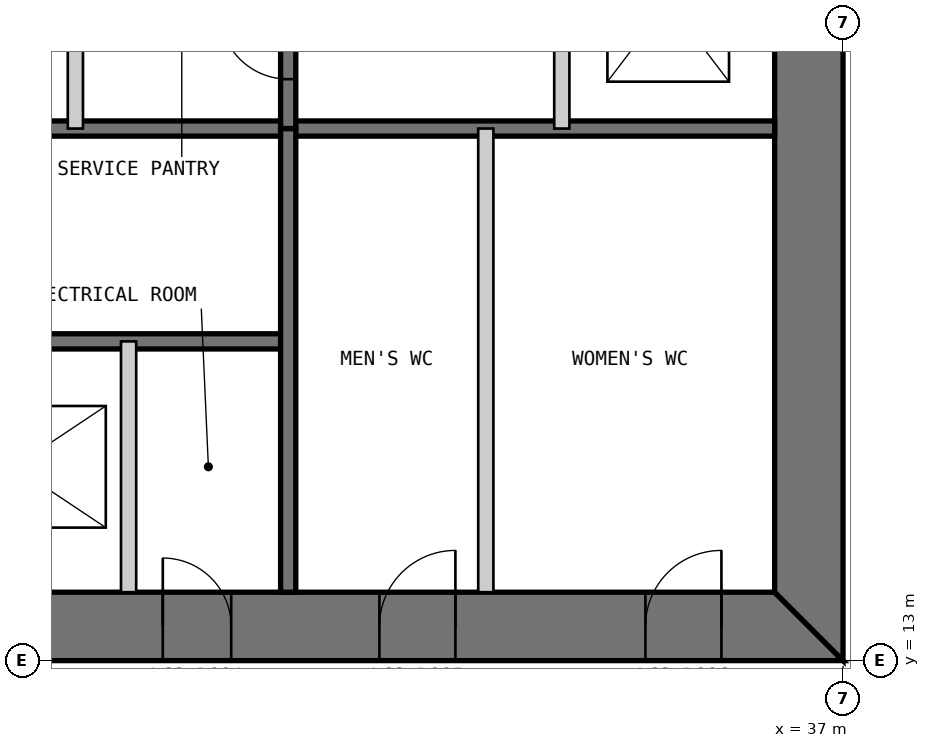
"""IFC4 building model, lengths in metres.
Left out: names, types, materials, properties, quantities, classifications, styles, units other than length and angle.
Written with IfcOpenShell. Run it as: python <this file> out.ifc"""

import sys

from ifc_helpers import new_model, si_unit, direction, frame, frame_2d, origin, place, context, subcontext, project, spatial, polyline, rectangle, outline, extrude, element, fill, save


model = new_model("IFC4")
c1 = context("Model", 3, precision=1e-05, world=origin(), true_north=direction((0.0, 1.0)))
c2 = subcontext(c1, "Body", "Model", "MODEL_VIEW")
j1 = project(units=[si_unit("LENGTHUNIT", "METRE"), si_unit("PLANEANGLEUNIT", "RADIAN")], contexts=[c1])
p1 = place(None, origin())
s1 = spatial("IfcSite", under=j1, at=p1, CompositionType="ELEMENT")
p2 = place(p1, origin())
s2 = spatial("IfcBuilding", under=s1, at=p2, CompositionType="ELEMENT")
p3 = place(p2, frame((0.0, 0.0, 262.8)))
s3 = spatial("IfcBuildingStorey", under=s2, at=p3, CompositionType="ELEMENT", Elevation=262.8)
p4 = place(p3, frame((13.0, 13.45, 0.0), z_axis=(0.0, 0.0, 1.0), x_axis=(1.0, 0.0, 0.0)))
e1 = element("IfcWall", 1, at=p4, inside=s3, PredefinedType="SHEAR", context=c2, shape_type="SweptSolid", body=[
    extrude(outline(polyline([(0.0, -0.45), (24.0, -0.45), (23.1, 0.45), (0.9, 0.45), (0.0, -0.45)])), origin(), (0.0, 0.0, 1.0), 3.4),
])
p5 = place(p4, frame((4.9, 0.0, 0.0)))
e2 = element("IfcOpeningElement", 2, at=p5, cuts=e1, PredefinedType="OPENING", context=c2, shape_type="SweptSolid", body=[
    extrude(rectangle(XDim=1.0, YDim=2.2, at=frame_2d((0.5, 1.1))), frame((0.0, 0.46, 0.0), z_axis=(0.0, -1.0, 0.0), x_axis=(1.0, 0.0, 0.0)), (0.0, 0.0, 1.0), 0.92),
])
p6 = place(p4, frame((8.9, 0.0, 0.0)))
e3 = element("IfcOpeningElement", 3, at=p6, cuts=e1, PredefinedType="OPENING", context=c2, shape_type="SweptSolid", body=[
    extrude(rectangle(XDim=1.1, YDim=2.2, at=frame_2d((0.55, 1.1))), frame((0.0, 0.46, 0.0), z_axis=(0.0, -1.0, 0.0), x_axis=(1.0, 0.0, 0.0)), (0.0, 0.0, 1.0), 0.92),
])
p7 = place(p4, frame((15.05, 0.0, 0.0)))
e4 = element("IfcOpeningElement", 4, at=p7, cuts=e1, PredefinedType="OPENING", context=c2, shape_type="SweptSolid", body=[
    extrude(rectangle(XDim=0.9, YDim=2.2, at=frame_2d((0.45, 1.1))), frame((0.0, 0.46, 0.0), z_axis=(0.0, -1.0, 0.0), x_axis=(1.0, 0.0, 0.0)), (0.0, 0.0, 1.0), 0.92),
])
p8 = place(p4, frame((17.9, 0.0, 0.0)))
e5 = element("IfcOpeningElement", 5, at=p8, cuts=e1, PredefinedType="OPENING", context=c2, shape_type="SweptSolid", body=[
    extrude(rectangle(XDim=1.0, YDim=2.2, at=frame_2d((0.5, 1.1))), frame((0.0, 0.46, 0.0), z_axis=(0.0, -1.0, 0.0), x_axis=(1.0, 0.0, 0.0)), (0.0, 0.0, 1.0), 0.92),
])
p9 = place(p4, frame((21.4, 0.0, 0.0)))
e6 = element("IfcOpeningElement", 6, at=p9, cuts=e1, PredefinedType="OPENING", context=c2, shape_type="SweptSolid", body=[
    extrude(rectangle(XDim=1.0, YDim=2.2, at=frame_2d((0.5, 1.1))), frame((0.0, 0.46, 0.0), z_axis=(0.0, -1.0, 0.0), x_axis=(1.0, 0.0, 0.0)), (0.0, 0.0, 1.0), 0.92),
])
p10 = place(p3, frame((36.55, 13.9, 0.0), z_axis=(0.0, 0.0, 1.0), x_axis=(0.0, 1.0, 0.0)))
e7 = element("IfcWall", 7, at=p10, inside=s3, PredefinedType="SHEAR", context=c2, shape_type="SweptSolid", body=[
    extrude(outline(polyline([(-0.9, -0.45), (23.1, -0.45), (22.2, 0.45), (0.0, 0.45), (-0.9, -0.45)])), origin(), (0.0, 0.0, 1.0), 3.4),
])
p11 = place(p10, frame((20.2, 0.0, 0.0)))
e8 = element("IfcOpeningElement", 8, at=p11, cuts=e7, PredefinedType="OPENING", context=c2, shape_type="SweptSolid", body=[
    extrude(rectangle(XDim=1.0, YDim=2.2, at=frame_2d((0.5, 1.1))), frame((0.0, 0.46, 0.0), z_axis=(0.0, -1.0, 0.0), x_axis=(1.0, 0.0, 0.0)), (0.0, 0.0, 1.0), 0.92),
])
p12 = place(p10, frame((17.25, 0.0, 0.0)))
e9 = element("IfcOpeningElement", 9, at=p12, cuts=e7, PredefinedType="OPENING", context=c2, shape_type="SweptSolid", body=[
    extrude(rectangle(XDim=0.9, YDim=2.2, at=frame_2d((0.45, 1.1))), frame((0.0, 0.46, 0.0), z_axis=(0.0, -1.0, 0.0), x_axis=(1.0, 0.0, 0.0)), (0.0, 0.0, 1.0), 0.92),
])
p13 = place(p3, frame((20.3, 17.2, 0.0), z_axis=(0.0, 0.0, 1.0), x_axis=(1.0, 0.0, 0.0)))
e10 = element("IfcWall", 10, at=p13, inside=s3, PredefinedType="SOLIDWALL", context=c2, shape_type="SweptSolid", body=[
    extrude(rectangle(XDim=9.4, YDim=0.2, at=frame_2d((4.7, 0.0))), origin(), (0.0, 0.0, 1.0), 3.2),
])
p14 = place(p13, frame((0.25, 0.0, 0.0)))
e11 = element("IfcOpeningElement", 11, at=p14, cuts=e10, PredefinedType="OPENING", context=c2, shape_type="SweptSolid", body=[
    extrude(rectangle(XDim=1.0, YDim=2.2, at=frame_2d((0.5, 1.1))), frame((0.0, 0.11, 0.0), z_axis=(0.0, -1.0, 0.0), x_axis=(1.0, 0.0, 0.0)), (0.0, 0.0, 1.0), 0.22),
])
p15 = place(p3, frame((20.3, 20.0, 0.0), z_axis=(0.0, 0.0, 1.0), x_axis=(1.0, 0.0, 0.0)))
e12 = element("IfcWall", 12, at=p15, inside=s3, PredefinedType="SOLIDWALL", context=c2, shape_type="SweptSolid", body=[
    extrude(rectangle(XDim=15.8, YDim=0.2, at=frame_2d((7.9, 0.0))), origin(), (0.0, 0.0, 1.0), 3.2),
])
p16 = place(p3, frame((27.6, 13.9, 0.0), z_axis=(0.0, 0.0, 1.0), x_axis=(0.0, 1.0, 0.0)))
e13 = element("IfcWall", 13, at=p16, inside=s3, PredefinedType="PARTITIONING", context=c2, shape_type="SweptSolid", body=[
    extrude(rectangle(XDim=3.3, YDim=0.2, at=frame_2d((1.65, 0.0))), origin(), (0.0, 0.0, 1.0), 3.2),
])
p17 = place(p3, frame((29.7, 13.9, 0.0), z_axis=(0.0, 0.0, 1.0), x_axis=(0.0, 1.0, 0.0)))
e14 = element("IfcWall", 14, at=p17, inside=s3, PredefinedType="SOLIDWALL", context=c2, shape_type="SweptSolid", body=[
    extrude(rectangle(XDim=6.1, YDim=0.2, at=frame_2d((3.05, 0.0))), origin(), (0.0, 0.0, 1.0), 3.2),
])
p18 = place(p3, frame((32.3, 13.9, 0.0), z_axis=(0.0, 0.0, 1.0), x_axis=(0.0, 1.0, 0.0)))
e15 = element("IfcWall", 15, at=p18, inside=s3, PredefinedType="PARTITIONING", context=c2, shape_type="SweptSolid", body=[
    extrude(rectangle(XDim=6.1, YDim=0.2, at=frame_2d((3.05, 0.0))), origin(), (0.0, 0.0, 1.0), 3.2),
])
p19 = place(p3, frame((33.3, 36.1, 0.0), z_axis=(0.0, 0.0, 1.0), x_axis=(0.0, -1.0, 0.0)))
e16 = element("IfcWall", 16, at=p19, inside=s3, PredefinedType="PARTITIONING", context=c2, shape_type="SweptSolid", body=[
    extrude(rectangle(XDim=16.1, YDim=0.2, at=frame_2d((8.05, 0.0))), origin(), (0.0, 0.0, 1.0), 3.2),
])
p20 = place(p19, frame((7.217, 0.0, 0.0)))
e17 = element("IfcOpeningElement", 17, at=p20, cuts=e16, PredefinedType="OPENING", context=c2, shape_type="SweptSolid", body=[
    extrude(rectangle(XDim=1.1, YDim=2.2, at=frame_2d((0.55, 1.1))), frame((0.0, 0.11, 0.0), z_axis=(0.0, -1.0, 0.0), x_axis=(1.0, 0.0, 0.0)), (0.0, 0.0, 1.0), 0.22),
])
p21 = place(p19, frame((10.55, 0.0, 0.0)))
e18 = element("IfcOpeningElement", 18, at=p21, cuts=e16, PredefinedType="OPENING", context=c2, shape_type="SweptSolid", body=[
    extrude(rectangle(XDim=1.1, YDim=2.2, at=frame_2d((0.55, 1.1))), frame((0.0, 0.11, 0.0), z_axis=(0.0, -1.0, 0.0), x_axis=(1.0, 0.0, 0.0)), (0.0, 0.0, 1.0), 0.22),
])
p22 = place(p19, frame((13.883, 0.0, 0.0)))
e19 = element("IfcOpeningElement", 19, at=p22, cuts=e16, PredefinedType="OPENING", context=c2, shape_type="SweptSolid", body=[
    extrude(rectangle(XDim=1.1, YDim=2.2, at=frame_2d((0.55, 1.1))), frame((0.0, 0.11, 0.0), z_axis=(0.0, -1.0, 0.0), x_axis=(1.0, 0.0, 0.0)), (0.0, 0.0, 1.0), 0.22),
])
p23 = place(p3, frame((29.7, 36.1, 0.0), z_axis=(0.0, 0.0, 1.0), x_axis=(0.0, -1.0, 0.0)))
e20 = element("IfcWall", 20, at=p23, inside=s3, PredefinedType="SOLIDWALL", context=c2, shape_type="SweptSolid", body=[
    extrude(rectangle(XDim=16.1, YDim=0.2, at=frame_2d((8.05, 0.0))), origin(), (0.0, 0.0, 1.0), 3.2),
])
p24 = place(p23, frame((7.85, 0.0, 0.0)))
e21 = element("IfcOpeningElement", 21, at=p24, cuts=e20, PredefinedType="OPENING", context=c2, shape_type="SweptSolid", body=[
    extrude(rectangle(XDim=0.9, YDim=2.2, at=frame_2d((0.45, 1.1))), frame((0.0, 0.11, 0.0), z_axis=(0.0, -1.0, 0.0), x_axis=(1.0, 0.0, 0.0)), (0.0, 0.0, 1.0), 0.22),
])
p25 = place(p23, frame((11.75, 0.0, 0.0)))
e22 = element("IfcOpeningElement", 22, at=p25, cuts=e20, PredefinedType="OPENING", context=c2, shape_type="SweptSolid", body=[
    extrude(rectangle(XDim=0.9, YDim=2.2, at=frame_2d((0.45, 1.1))), frame((0.0, 0.11, 0.0), z_axis=(0.0, -1.0, 0.0), x_axis=(1.0, 0.0, 0.0)), (0.0, 0.0, 1.0), 0.22),
])
p26 = place(p23, frame((14.55, 0.0, 0.0)))
e23 = element("IfcOpeningElement", 23, at=p26, cuts=e20, PredefinedType="OPENING", context=c2, shape_type="SweptSolid", body=[
    extrude(rectangle(XDim=0.9, YDim=2.2, at=frame_2d((0.45, 1.1))), frame((0.0, 0.11, 0.0), z_axis=(0.0, -1.0, 0.0), x_axis=(1.0, 0.0, 0.0)), (0.0, 0.0, 1.0), 0.22),
])
p27 = place(p3, frame((26.9, 30.0, 0.0), z_axis=(0.0, 0.0, 1.0), x_axis=(0.0, -1.0, 0.0)))
e24 = element("IfcWall", 24, at=p27, inside=s3, PredefinedType="PARTITIONING", context=c2, shape_type="SweptSolid", body=[
    extrude(rectangle(XDim=10.0, YDim=0.2, at=frame_2d((5.0, 0.0))), origin(), (0.0, 0.0, 1.0), 3.2),
])
p28 = place(p7, origin())
e25 = element("IfcDoor", 25, at=p28, inside=s3, OperationType="SINGLE_SWING_LEFT", PredefinedType="DOOR", context=c2, shape_type="SweptSolid", body=[
    extrude(rectangle(XDim=0.9, YDim=2.2, at=frame_2d((0.45, 1.1))), frame((0.0, 0.025, 0.0), z_axis=(0.0, -1.0, 0.0), x_axis=(1.0, 0.0, 0.0)), (0.0, 0.0, 1.0), 0.05),
    extrude(outline(polyline([(0.0, 0.0), (0.04, 0.0), (0.04, 2.16), (0.86, 2.16), (0.86, 0.0), (0.9, 0.0), (0.9, 2.2), (0.0, 2.2), (0.0, 0.0)])), frame((0.0, 0.3, 0.0), z_axis=(0.0, -1.0, 0.0), x_axis=(1.0, 0.0, 0.0)), (0.0, 0.0, 1.0), 0.6),
])
fill(e4, e25)
p29 = place(p8, origin())
e26 = element("IfcDoor", 26, at=p29, inside=s3, OperationType="SINGLE_SWING_RIGHT", PredefinedType="DOOR", context=c2, shape_type="SweptSolid", body=[
    extrude(rectangle(XDim=1.0, YDim=2.2, at=frame_2d((0.5, 1.1))), frame((0.0, 0.025, 0.0), z_axis=(0.0, -1.0, 0.0), x_axis=(1.0, 0.0, 0.0)), (0.0, 0.0, 1.0), 0.05),
    extrude(outline(polyline([(0.0, 0.0), (0.04, 0.0), (0.04, 2.16), (0.96, 2.16), (0.96, 0.0), (1.0, 0.0), (1.0, 2.2), (0.0, 2.2), (0.0, 0.0)])), frame((0.0, 0.3, 0.0), z_axis=(0.0, -1.0, 0.0), x_axis=(1.0, 0.0, 0.0)), (0.0, 0.0, 1.0), 0.6),
])
fill(e5, e26)
p30 = place(p9, origin())
e27 = element("IfcDoor", 27, at=p30, inside=s3, OperationType="SINGLE_SWING_RIGHT", PredefinedType="DOOR", context=c2, shape_type="SweptSolid", body=[
    extrude(rectangle(XDim=1.0, YDim=2.2, at=frame_2d((0.5, 1.1))), frame((0.0, 0.025, 0.0), z_axis=(0.0, -1.0, 0.0), x_axis=(1.0, 0.0, 0.0)), (0.0, 0.0, 1.0), 0.05),
    extrude(outline(polyline([(0.0, 0.0), (0.04, 0.0), (0.04, 2.16), (0.96, 2.16), (0.96, 0.0), (1.0, 0.0), (1.0, 2.2), (0.0, 2.2), (0.0, 0.0)])), frame((0.0, 0.3, 0.0), z_axis=(0.0, -1.0, 0.0), x_axis=(1.0, 0.0, 0.0)), (0.0, 0.0, 1.0), 0.6),
])
fill(e6, e27)
p31 = place(p26, frame((0.9, 0.0, 0.0), z_axis=(0.0, 0.0, 1.0), x_axis=(-1.0, 0.0, 0.0)))
e28 = element("IfcDoor", 28, at=p31, inside=s3, OperationType="SINGLE_SWING_RIGHT", PredefinedType="DOOR", context=c2, shape_type="SweptSolid", body=[
    extrude(rectangle(XDim=0.9, YDim=2.2, at=frame_2d((0.45, 1.1))), frame((0.0, 0.025, 0.0), z_axis=(0.0, -1.0, 0.0), x_axis=(1.0, 0.0, 0.0)), (0.0, 0.0, 1.0), 0.05),
])
fill(e23, e28)
save(model, sys.argv[1])
